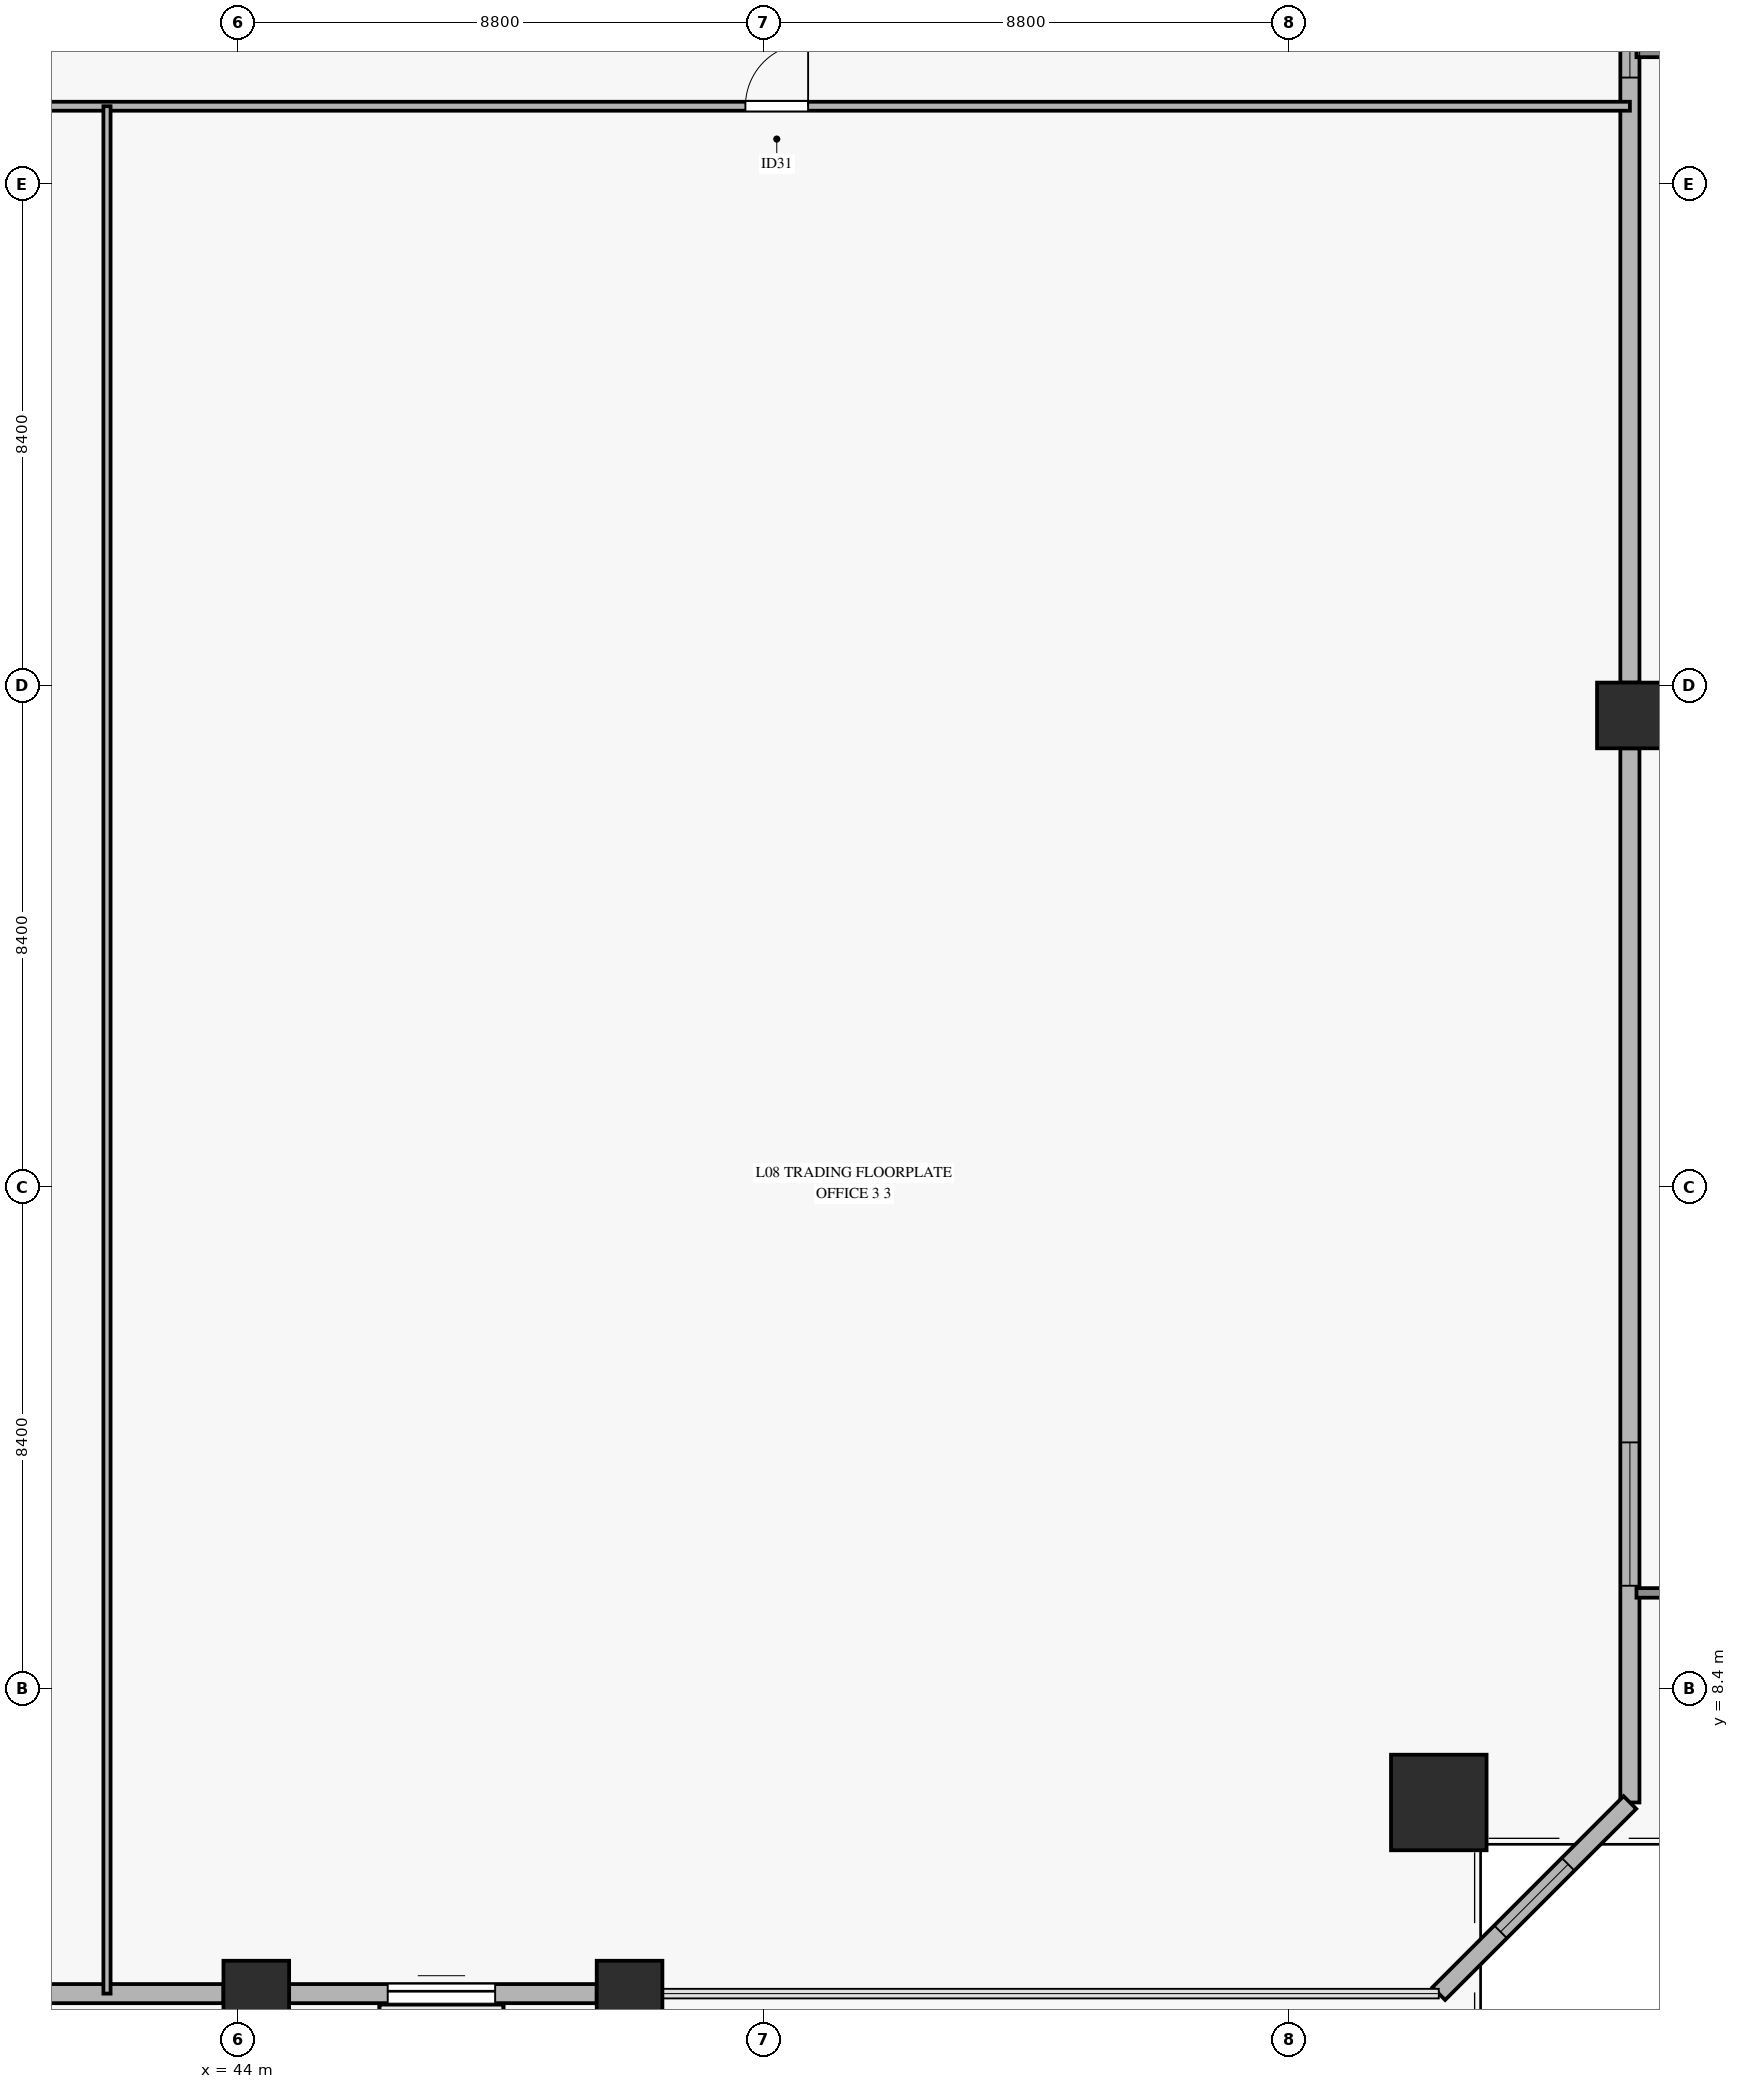
"""IFC4 building model, lengths in metres.
Left out: names, types, materials, properties, quantities, classifications, styles, units other than length and angle.
Written with IfcOpenShell. Run it as: python <this file> out.ifc"""

import sys

from ifc_helpers import new_model, si_unit, direction, frame, frame_2d, origin, origin_2d, place, context, subcontext, project, spatial, rectangle, hollow_rectangle, extrude, source, transform, mapped, element, fill, save


model = new_model("IFC4")
c1 = context("Model", 3, precision=1e-05, world=origin(), true_north=direction((0.0, 1.0)))
c2 = subcontext(c1, "Body", "Model", "MODEL_VIEW")
j1 = project(units=[si_unit("LENGTHUNIT", "METRE"), si_unit("PLANEANGLEUNIT", "RADIAN")], contexts=[c1])
p1 = place(None, origin())
s1 = spatial("IfcSite", under=j1, at=p1, CompositionType="ELEMENT")
p2 = place(p1, origin())
s2 = spatial("IfcBuilding", under=s1, at=p2, CompositionType="ELEMENT")
p3 = place(p2, frame((0.0, 0.0, 33.2)))
s3 = spatial("IfcBuildingStorey", under=s2, at=p3, CompositionType="ELEMENT", Elevation=33.2)
m1 = source(origin(), c2, "Body", "SweptSolid", [
    extrude(hollow_rectangle(XDim=1.6, YDim=1.6, WallThickness=0.075, at=origin_2d()), origin(), (0.0, 0.0, 1.0), 3.72),
])
p4 = place(p3, frame((64.1, 6.5, 0.0), z_axis=(-0.056182353256, 0.134680127199, 0.989295105881), x_axis=(-0.922917163749, -0.384998582929, 0.0)))
e1 = element("IfcColumn", 1, at=p4, inside=s3, PredefinedType="COLUMN", context=c2, shape_type="MappedRepresentation", body=[
    mapped(m1, transform((0.0, 0.0, 0.0), x_axis=(1.0, 0.0, 0.0), y_axis=(0.0, 1.0, 0.0), z_axis=(0.0, 0.0, 1.0), scale=1.0)),
])
m2 = source(origin(), c2, "Body", "SweptSolid", [
    extrude(hollow_rectangle(XDim=1.1, YDim=1.1, WallThickness=0.05, at=origin_2d()), origin(), (0.0, 0.0, 1.0), 3.718),
])
for number, where, z_axis, x_axis in (
    (2, (44.3, 3.3, 0.0), (0.0, 0.142, 0.99), (-1.0, 0.0, 0.0)),
    (3, (50.55, 3.3, 0.0), (0.0, 0.142, 0.99), (-1.0, 0.0, 0.0)),
):
    element("IfcColumn", number, at=place(p3, frame(where, z_axis=z_axis, x_axis=x_axis)), inside=s3, PredefinedType="COLUMN", context=c2, shape_type="MappedRepresentation", body=[
        mapped(m2, transform((0.0, 0.0, 0.0), x_axis=(1.0, 0.0, 0.0), y_axis=(0.0, 1.0, 0.0), z_axis=(0.0, 0.0, 1.0), scale=1.0)),
    ])
m3 = source(origin(), c2, "Body", "SweptSolid", [
    extrude(hollow_rectangle(XDim=1.1, YDim=1.1, WallThickness=0.05, at=origin_2d()), origin(), (0.0, 0.0, 1.0), 3.697),
])
p5 = place(p3, frame((67.3, 24.7, 0.0), z_axis=(-0.063597597914, 0.071126285518, 0.995437791651), x_axis=(-0.745458506367, -0.666552034941, 0.0)))
e4 = element("IfcColumn", 4, at=p5, inside=s3, PredefinedType="COLUMN", context=c2, shape_type="MappedRepresentation", body=[
    mapped(m3, transform((0.0, 0.0, 0.0), x_axis=(1.0, 0.0, 0.0), y_axis=(0.0, 1.0, 0.0), z_axis=(0.0, 0.0, 1.0), scale=1.0)),
])
p6 = place(p3, frame((38.1, 3.3, 0.0), z_axis=(0.0, 0.0, 1.0), x_axis=(1.0, 0.0, 0.0)))
e5 = element("IfcWall", 5, at=p6, inside=s3, PredefinedType="SOLIDWALL", context=c2, shape_type="SweptSolid", body=[
    extrude(rectangle(XDim=5.65, YDim=0.32, at=frame_2d((2.825, 0.0))), origin(), (0.0, 0.0, 1.0), 3.16),
])
p7 = place(p3, frame((44.85, 3.3, 0.0), z_axis=(0.0, 0.0, 1.0), x_axis=(1.0, 0.0, 0.0)))
e6 = element("IfcWall", 6, at=p7, inside=s3, PredefinedType="SOLIDWALL", context=c2, shape_type="SweptSolid", body=[
    extrude(rectangle(XDim=5.15, YDim=0.32, at=frame_2d((2.575, 0.0))), origin(), (0.0, 0.0, 1.0), 3.16),
])
p8 = place(p7, frame((1.65, 0.0, 0.0)))
e7 = element("IfcOpeningElement", 7, at=p8, cuts=e6, PredefinedType="OPENING", context=c2, shape_type="SweptSolid", body=[
    extrude(rectangle(XDim=1.8, YDim=2.25, at=frame_2d((0.9, 1.125))), frame((0.0, 0.17, 0.0), z_axis=(0.0, -1.0, 0.0), x_axis=(1.0, 0.0, 0.0)), (0.0, 0.0, 1.0), 0.34),
])
p9 = place(p3, frame((67.3, 6.5, 0.0), z_axis=(0.0, 0.0, 1.0), x_axis=(0.0, 1.0, 0.0)))
e8 = element("IfcWall", 8, at=p9, inside=s3, PredefinedType="SOLIDWALL", context=c2, shape_type="SweptSolid", body=[
    extrude(rectangle(XDim=17.65, YDim=0.32, at=frame_2d((8.825, 0.0))), origin(), (0.0, 0.0, 1.0), 3.16),
])
p10 = place(p9, frame((3.629, 0.0, 0.45)))
e9 = element("IfcOpeningElement", 9, at=p10, cuts=e8, PredefinedType="OPENING", context=c2, shape_type="SweptSolid", body=[
    extrude(rectangle(XDim=2.4, YDim=2.1, at=frame_2d((1.2, 1.05))), frame((0.0, 0.17, 0.0), z_axis=(0.0, -1.0, 0.0), x_axis=(1.0, 0.0, 0.0)), (0.0, 0.0, 1.0), 0.34),
])
p11 = place(p3, frame((67.3, 25.25, 0.0), z_axis=(0.0, 0.0, 1.0), x_axis=(0.0, 1.0, 0.0)))
e10 = element("IfcWall", 10, at=p11, inside=s3, PredefinedType="SOLIDWALL", context=c2, shape_type="SweptSolid", body=[
    extrude(rectangle(XDim=17.65, YDim=0.32, at=frame_2d((8.825, 0.0))), origin(), (0.0, 0.0, 1.0), 3.16),
])
p12 = place(p11, frame((10.13, 0.0, 0.45)))
e11 = element("IfcOpeningElement", 11, at=p12, cuts=e10, PredefinedType="OPENING", context=c2, shape_type="SweptSolid", body=[
    extrude(rectangle(XDim=1.6, YDim=2.0, at=frame_2d((0.8, 1.0))), frame((0.0, 0.17, 0.0), z_axis=(0.0, -1.0, 0.0), x_axis=(1.0, 0.0, 0.0)), (0.0, 0.0, 1.0), 0.34),
])
p13 = place(p3, frame((64.1, 3.3, 0.0), z_axis=(0.0, 0.0, 1.0), x_axis=(0.707106781187, 0.707106781187, 0.0)))
e12 = element("IfcWall", 12, at=p13, inside=s3, PredefinedType="SOLIDWALL", context=c2, shape_type="SweptSolid", body=[
    extrude(rectangle(XDim=4.525, YDim=0.3, at=frame_2d((2.263, 0.0))), origin(), (0.0, 0.0, 1.0), 3.16),
])
p14 = place(p13, frame((1.463, 0.0, 0.45)))
e13 = element("IfcOpeningElement", 13, at=p14, cuts=e12, PredefinedType="OPENING", context=c2, shape_type="SweptSolid", body=[
    extrude(rectangle(XDim=1.6, YDim=2.0, at=frame_2d((0.8, 1.0))), frame((0.0, 0.16, 0.0), z_axis=(0.0, -1.0, 0.0), x_axis=(1.0, 0.0, 0.0)), (0.0, 0.0, 1.0), 0.32),
])
p15 = place(p3, frame((3.1, 34.9, 0.0), z_axis=(0.0, 0.0, 1.0), x_axis=(1.0, 0.0, 0.0)))
e14 = element("IfcWall", 14, at=p15, inside=s3, PredefinedType="PARTITIONING", context=c2, shape_type="SweptSolid", body=[
    extrude(rectangle(XDim=64.2, YDim=0.15, at=frame_2d((32.1, 0.0))), origin(), (0.0, 0.0, 1.0), 2.765),
])
p16 = place(p15, frame((11.545, 0.0, 0.0)))
e15 = element("IfcOpeningElement", 15, at=p16, cuts=e14, PredefinedType="OPENING", context=c2, shape_type="SweptSolid", body=[
    extrude(rectangle(XDim=1.05, YDim=2.15, at=frame_2d((0.525, 1.075))), frame((0.0, 0.085, 0.0), z_axis=(0.0, -1.0, 0.0), x_axis=(1.0, 0.0, 0.0)), (0.0, 0.0, 1.0), 0.17),
])
p17 = place(p15, frame((31.787, 0.0, 0.0)))
e16 = element("IfcOpeningElement", 16, at=p17, cuts=e14, PredefinedType="OPENING", context=c2, shape_type="SweptSolid", body=[
    extrude(rectangle(XDim=1.05, YDim=2.15, at=frame_2d((0.525, 1.075))), frame((0.0, 0.085, 0.0), z_axis=(0.0, -1.0, 0.0), x_axis=(1.0, 0.0, 0.0)), (0.0, 0.0, 1.0), 0.17),
])
p18 = place(p15, frame((49.39, 0.0, 0.0)))
e17 = element("IfcOpeningElement", 17, at=p18, cuts=e14, PredefinedType="OPENING", context=c2, shape_type="SweptSolid", body=[
    extrude(rectangle(XDim=1.05, YDim=2.15, at=frame_2d((0.525, 1.075))), frame((0.0, 0.085, 0.0), z_axis=(0.0, -1.0, 0.0), x_axis=(1.0, 0.0, 0.0)), (0.0, 0.0, 1.0), 0.17),
])
p19 = place(p3, frame((41.8, 3.3, 0.0), z_axis=(0.0, 0.0, 1.0), x_axis=(0.0, 1.0, 0.0)))
e18 = element("IfcWall", 18, at=p19, inside=s3, PredefinedType="PARTITIONING", context=c2, shape_type="SweptSolid", body=[
    extrude(rectangle(XDim=31.6, YDim=0.12, at=frame_2d((15.8, 0.0))), origin(), (0.0, 0.0, 1.0), 3.165),
])
m4 = source(origin(), c2, "Body", "SweptSolid", [
    extrude(rectangle(XDim=1.8, YDim=2.25, at=frame_2d((0.9, 1.125))), frame((0.0, 0.025, 0.0), z_axis=(0.0, -1.0, 0.0), x_axis=(1.0, 0.0, 0.0)), (0.0, 0.0, 1.0), 0.05),
])
p20 = place(p8, origin())
e19 = element("IfcDoor", 19, at=p20, inside=s3, OperationType="SLIDING_TO_LEFT", PredefinedType="DOOR", context=c2, shape_type="MappedRepresentation", body=[
    mapped(m4, transform((0.0, 0.0, 0.0), x_axis=(1.0, 0.0, 0.0), y_axis=(0.0, 1.0, 0.0), z_axis=(0.0, 0.0, 1.0), scale=1.0)),
])
fill(e7, e19)
m5 = source(origin(), c2, "Body", "SweptSolid", [
    extrude(rectangle(XDim=2.4, YDim=2.1, at=frame_2d((1.2, 1.05))), frame((0.0, 0.03, 0.0), z_axis=(0.0, -1.0, 0.0), x_axis=(1.0, 0.0, 0.0)), (0.0, 0.0, 1.0), 0.06),
])
p21 = place(p10, origin())
e20 = element("IfcWindow", 20, at=p21, inside=s3, PartitioningType="SINGLE_PANEL", PredefinedType="WINDOW", context=c2, shape_type="MappedRepresentation", body=[
    mapped(m5, transform((0.0, 0.0, 0.0), x_axis=(1.0, 0.0, 0.0), y_axis=(0.0, 1.0, 0.0), z_axis=(0.0, 0.0, 1.0), scale=1.0)),
])
fill(e9, e20)
m6 = source(origin(), c2, "Body", "SweptSolid", [
    extrude(rectangle(XDim=1.6, YDim=2.0, at=frame_2d((0.8, 1.0))), frame((0.0, 0.03, 0.0), z_axis=(0.0, -1.0, 0.0), x_axis=(1.0, 0.0, 0.0)), (0.0, 0.0, 1.0), 0.06),
])
p22 = place(p12, origin())
e21 = element("IfcWindow", 21, at=p22, inside=s3, PartitioningType="SINGLE_PANEL", PredefinedType="WINDOW", context=c2, shape_type="MappedRepresentation", body=[
    mapped(m6, transform((0.0, 0.0, 0.0), x_axis=(1.0, 0.0, 0.0), y_axis=(0.0, 1.0, 0.0), z_axis=(0.0, 0.0, 1.0), scale=1.0)),
])
fill(e11, e21)
p23 = place(p14, origin())
e22 = element("IfcWindow", 22, at=p23, inside=s3, PartitioningType="SINGLE_PANEL", PredefinedType="WINDOW", context=c2, shape_type="MappedRepresentation", body=[
    mapped(m6, transform((0.0, 0.0, 0.0), x_axis=(1.0, 0.0, 0.0), y_axis=(0.0, 1.0, 0.0), z_axis=(0.0, 0.0, 1.0), scale=1.0)),
])
fill(e13, e22)
m7 = source(origin(), c2, "Body", "SweptSolid", [
    extrude(rectangle(XDim=1.05, YDim=2.15, at=frame_2d((0.525, 1.075))), frame((0.0, 0.025, 0.0), z_axis=(0.0, -1.0, 0.0), x_axis=(1.0, 0.0, 0.0)), (0.0, 0.0, 1.0), 0.05),
])
p24 = place(p18, origin())
e23 = element("IfcDoor", 23, at=p24, inside=s3, OperationType="SINGLE_SWING_RIGHT", PredefinedType="DOOR", context=c2, shape_type="MappedRepresentation", body=[
    mapped(m7, transform((0.0, 0.0, 0.0), x_axis=(1.0, 0.0, 0.0), y_axis=(0.0, 1.0, 0.0), z_axis=(0.0, 0.0, 1.0), scale=1.0)),
])
fill(e17, e23)
save(model, sys.argv[1])
